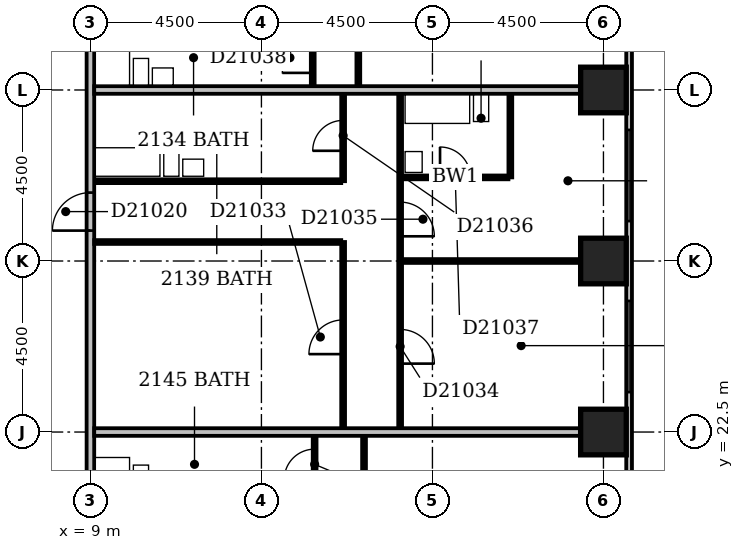
"""IFC4 building model, lengths in metres.
Left out: names, types, materials, properties, quantities, classifications, styles, units other than length and angle.
Written with IfcOpenShell. Run it as: python <this file> out.ifc"""

import sys

from ifc_helpers import new_model, si_unit, direction, frame, frame_2d, origin, origin_2d, place, context, subcontext, project, spatial, rectangle, extrude, element, fill, save


model = new_model("IFC4")
c1 = context("Model", 3, precision=1e-05, world=origin(), true_north=direction((0.0, 1.0)))
c2 = subcontext(c1, "Body", "Model", "MODEL_VIEW")
j1 = project(units=[si_unit("LENGTHUNIT", "METRE"), si_unit("PLANEANGLEUNIT", "RADIAN")], contexts=[c1])
p1 = place(None, origin())
s1 = spatial("IfcSite", under=j1, at=p1, CompositionType="ELEMENT")
p2 = place(p1, origin())
s2 = spatial("IfcBuilding", under=s1, at=p2, CompositionType="ELEMENT")
p3 = place(p2, frame((0.0, 0.0, 86.6)))
s3 = spatial("IfcBuildingStorey", under=s2, at=p3, CompositionType="ELEMENT", Elevation=86.6)
for number, where, z_axis, x_axis in (
    (1, (22.5, 22.5, -0.3), (0.0, 0.0, 1.0), (1.0, 0.0, 0.0)),
    (2, (22.5, 27.0, -0.3), (0.0, 0.0, 1.0), (1.0, 0.0, 0.0)),
    (3, (22.5, 31.5, -0.3), (0.0, 0.0, 1.0), (1.0, 0.0, 0.0)),
):
    element("IfcColumn", number, at=place(p3, frame(where, z_axis=z_axis, x_axis=x_axis)), inside=s3, PredefinedType="COLUMN", context=c2, shape_type="SweptSolid", body=[
        extrude(rectangle(XDim=1.2, YDim=1.2, at=origin_2d()), origin(), (0.0, 0.0, 1.0), 3.6),
    ])
p4 = place(p3, frame((23.175, 17.4, 0.0), z_axis=(0.0, 0.0, 1.0), x_axis=(0.0, 1.0, 0.0)))
e4 = element("IfcWall", 4, at=p4, inside=s3, PredefinedType="STANDARD", context=c2, shape_type="SweptSolid", body=[
    extrude(rectangle(XDim=17.85, YDim=0.15, at=frame_2d((8.925, 0.0))), origin(), (0.0, 0.0, 1.0), 2.7),
])
p5 = place(p4, frame((1.435, 0.0, 0.6)))
e5 = element("IfcOpeningElement", 5, at=p5, cuts=e4, PredefinedType="OPENING", context=c2, shape_type="SweptSolid", body=[
    extrude(rectangle(XDim=2.1, YDim=1.8, at=frame_2d((1.05, 0.9))), frame((0.0, 0.087, 0.0), z_axis=(0.0, -1.0, 0.0), x_axis=(1.0, 0.0, 0.0)), (0.0, 0.0, 1.0), 0.174),
])
p6 = place(p4, frame((6.15, 0.0, 0.6)))
e6 = element("IfcOpeningElement", 6, at=p6, cuts=e4, PredefinedType="OPENING", context=c2, shape_type="SweptSolid", body=[
    extrude(rectangle(XDim=2.4, YDim=1.8, at=frame_2d((1.2, 0.9))), frame((0.0, 0.087, 0.0), z_axis=(0.0, -1.0, 0.0), x_axis=(1.0, 0.0, 0.0)), (0.0, 0.0, 1.0), 0.174),
])
p7 = place(p4, frame((10.65, 0.0, 0.6)))
e7 = element("IfcOpeningElement", 7, at=p7, cuts=e4, PredefinedType="OPENING", context=c2, shape_type="SweptSolid", body=[
    extrude(rectangle(XDim=2.4, YDim=1.8, at=frame_2d((1.2, 0.9))), frame((0.0, 0.087, 0.0), z_axis=(0.0, -1.0, 0.0), x_axis=(1.0, 0.0, 0.0)), (0.0, 0.0, 1.0), 0.174),
])
p8 = place(p4, frame((15.15, 0.0, 0.6)))
e8 = element("IfcOpeningElement", 8, at=p8, cuts=e4, PredefinedType="OPENING", context=c2, shape_type="SweptSolid", body=[
    extrude(rectangle(XDim=2.4, YDim=1.8, at=frame_2d((1.2, 0.9))), frame((0.0, 0.087, 0.0), z_axis=(0.0, -1.0, 0.0), x_axis=(1.0, 0.0, 0.0)), (0.0, 0.0, 1.0), 0.174),
])
p9 = place(p3, frame((9.0, 5.0, 0.0), z_axis=(0.0, 0.0, 1.0), x_axis=(0.0, 1.0, 0.0)))
e9 = element("IfcWall", 9, at=p9, inside=s3, PredefinedType="PARTITIONING", context=c2, shape_type="SweptSolid", body=[
    extrude(rectangle(XDim=44.5, YDim=0.2, at=frame_2d((22.25, 0.0))), origin(), (0.0, 0.0, 1.0), 3.3),
])
p10 = place(p9, frame((28.45, 0.0, 0.0)))
e10 = element("IfcOpeningElement", 10, at=p10, cuts=e9, PredefinedType="OPENING", context=c2, shape_type="SweptSolid", body=[
    extrude(rectangle(XDim=1.0, YDim=2.1, at=frame_2d((0.5, 1.05))), frame((0.0, 0.112, 0.0), z_axis=(0.0, -1.0, 0.0), x_axis=(1.0, 0.0, 0.0)), (0.0, 0.0, 1.0), 0.224),
])
p11 = place(p9, frame((22.8, 0.0, 0.0)))
e11 = element("IfcOpeningElement", 11, at=p11, cuts=e9, PredefinedType="OPENING", context=c2, shape_type="SweptSolid", body=[
    extrude(rectangle(XDim=1.0, YDim=2.1, at=frame_2d((0.5, 1.05))), frame((0.0, 0.112, 0.0), z_axis=(0.0, -1.0, 0.0), x_axis=(1.0, 0.0, 0.0)), (0.0, 0.0, 1.0), 0.224),
])
p12 = place(p9, frame((14.55, 0.0, 0.0)))
e12 = element("IfcOpeningElement", 12, at=p12, cuts=e9, PredefinedType="OPENING", context=c2, shape_type="SweptSolid", body=[
    extrude(rectangle(XDim=1.0, YDim=2.1, at=frame_2d((0.5, 1.05))), frame((0.0, 0.112, 0.0), z_axis=(0.0, -1.0, 0.0), x_axis=(1.0, 0.0, 0.0)), (0.0, 0.0, 1.0), 0.224),
])
p13 = place(p9, frame((9.3, 0.0, 0.0)))
e13 = element("IfcOpeningElement", 13, at=p13, cuts=e9, PredefinedType="OPENING", context=c2, shape_type="SweptSolid", body=[
    extrude(rectangle(XDim=1.0, YDim=2.1, at=frame_2d((0.5, 1.05))), frame((0.0, 0.112, 0.0), z_axis=(0.0, -1.0, 0.0), x_axis=(1.0, 0.0, 0.0)), (0.0, 0.0, 1.0), 0.224),
])
p14 = place(p9, frame((35.0, 0.0, 0.0)))
e14 = element("IfcOpeningElement", 14, at=p14, cuts=e9, PredefinedType="OPENING", context=c2, shape_type="SweptSolid", body=[
    extrude(rectangle(XDim=0.9, YDim=2.1, at=frame_2d((0.45, 1.05))), frame((0.0, 0.112, 0.0), z_axis=(0.0, -1.0, 0.0), x_axis=(1.0, 0.0, 0.0)), (0.0, 0.0, 1.0), 0.224),
])
p15 = place(p9, frame((1.5, 0.0, 0.0)))
e15 = element("IfcOpeningElement", 15, at=p15, cuts=e9, PredefinedType="OPENING", context=c2, shape_type="SweptSolid", body=[
    extrude(rectangle(XDim=0.9, YDim=2.1, at=frame_2d((0.45, 1.05))), frame((0.0, 0.112, 0.0), z_axis=(0.0, -1.0, 0.0), x_axis=(1.0, 0.0, 0.0)), (0.0, 0.0, 1.0), 0.224),
])
p16 = place(p3, frame((16.2, 18.1, 0.0), z_axis=(0.0, 0.0, 1.0), x_axis=(0.0, 1.0, 0.0)))
e16 = element("IfcWall", 16, at=p16, inside=s3, PredefinedType="PARTITIONING", context=c2, shape_type="SweptSolid", body=[
    extrude(rectangle(XDim=4.3, YDim=0.1, at=frame_2d((2.15, 0.0))), origin(), (0.0, 0.0, 1.0), 3.3),
])
p17 = place(p16, frame((1.7, 0.0, 0.0)))
e17 = element("IfcOpeningElement", 17, at=p17, cuts=e16, PredefinedType="OPENING", context=c2, shape_type="SweptSolid", body=[
    extrude(rectangle(XDim=0.9, YDim=2.1, at=frame_2d((0.45, 1.05))), frame((0.0, 0.062, 0.0), z_axis=(0.0, -1.0, 0.0), x_axis=(1.0, 0.0, 0.0)), (0.0, 0.0, 1.0), 0.124),
])
p18 = place(p3, frame((14.9, 20.8, 0.0), z_axis=(0.0, 0.0, 1.0), x_axis=(0.0, 1.0, 0.0)))
e18 = element("IfcWall", 18, at=p18, inside=s3, PredefinedType="PARTITIONING", context=c2, shape_type="SweptSolid", body=[
    extrude(rectangle(XDim=1.6, YDim=0.1, at=frame_2d((0.8, 0.0))), origin(), (0.0, 0.0, 1.0), 3.3),
])
p19 = place(p18, frame((0.45, 0.0, 0.0)))
e19 = element("IfcOpeningElement", 19, at=p19, cuts=e18, PredefinedType="OPENING", context=c2, shape_type="SweptSolid", body=[
    extrude(rectangle(XDim=0.8, YDim=2.1, at=frame_2d((0.4, 1.05))), frame((0.0, 0.062, 0.0), z_axis=(0.0, -1.0, 0.0), x_axis=(1.0, 0.0, 0.0)), (0.0, 0.0, 1.0), 0.124),
])
p20 = place(p3, frame((9.1, 22.5, 0.0), z_axis=(0.0, 0.0, 1.0), x_axis=(1.0, 0.0, 0.0)))
e20 = element("IfcWall", 20, at=p20, inside=s3, PredefinedType="PARTITIONING", context=c2, shape_type="SweptSolid", body=[
    extrude(rectangle(XDim=12.8, YDim=0.2, at=frame_2d((6.4, 0.0))), origin(), (0.0, 0.0, 1.0), 3.3),
])
p21 = place(p3, frame((15.65, 22.6, 0.0), z_axis=(0.0, 0.0, 1.0), x_axis=(0.0, 1.0, 0.0)))
e21 = element("IfcWall", 21, at=p21, inside=s3, PredefinedType="PARTITIONING", context=c2, shape_type="SweptSolid", body=[
    extrude(rectangle(XDim=4.9, YDim=0.1, at=frame_2d((2.45, 0.0))), origin(), (0.0, 0.0, 1.0), 3.3),
])
p22 = place(p21, frame((1.95, 0.0, 0.0)))
e22 = element("IfcOpeningElement", 22, at=p22, cuts=e21, PredefinedType="OPENING", context=c2, shape_type="SweptSolid", body=[
    extrude(rectangle(XDim=0.9, YDim=2.1, at=frame_2d((0.45, 1.05))), frame((0.0, 0.062, 0.0), z_axis=(0.0, -1.0, 0.0), x_axis=(1.0, 0.0, 0.0)), (0.0, 0.0, 1.0), 0.124),
])
p23 = place(p3, frame((17.15, 22.6, 0.0), z_axis=(0.0, 0.0, 1.0), x_axis=(0.0, 1.0, 0.0)))
e23 = element("IfcWall", 23, at=p23, inside=s3, PredefinedType="PARTITIONING", context=c2, shape_type="SweptSolid", body=[
    extrude(rectangle(XDim=8.8, YDim=0.1, at=frame_2d((4.4, 0.0))), origin(), (0.0, 0.0, 1.0), 3.3),
])
p24 = place(p23, frame((1.7, 0.0, 0.0)))
e24 = element("IfcOpeningElement", 24, at=p24, cuts=e23, PredefinedType="OPENING", context=c2, shape_type="SweptSolid", body=[
    extrude(rectangle(XDim=0.9, YDim=2.1, at=frame_2d((0.45, 1.05))), frame((0.0, 0.062, 0.0), z_axis=(0.0, -1.0, 0.0), x_axis=(1.0, 0.0, 0.0)), (0.0, 0.0, 1.0), 0.124),
])
p25 = place(p23, frame((5.05, 0.0, 0.0)))
e25 = element("IfcOpeningElement", 25, at=p25, cuts=e23, PredefinedType="OPENING", context=c2, shape_type="SweptSolid", body=[
    extrude(rectangle(XDim=0.9, YDim=2.1, at=frame_2d((0.45, 1.05))), frame((0.0, 0.062, 0.0), z_axis=(0.0, -1.0, 0.0), x_axis=(1.0, 0.0, 0.0)), (0.0, 0.0, 1.0), 0.124),
])
p26 = place(p3, frame((17.2, 27.0, 0.0), z_axis=(0.0, 0.0, 1.0), x_axis=(1.0, 0.0, 0.0)))
e26 = element("IfcWall", 26, at=p26, inside=s3, PredefinedType="PARTITIONING", context=c2, shape_type="SweptSolid", body=[
    extrude(rectangle(XDim=4.7, YDim=0.1, at=frame_2d((2.35, 0.0))), origin(), (0.0, 0.0, 1.0), 2.7),
])
p27 = place(p3, frame((9.1, 27.5, 0.0), z_axis=(0.0, 0.0, 1.0), x_axis=(1.0, 0.0, 0.0)))
e27 = element("IfcWall", 27, at=p27, inside=s3, PredefinedType="PARTITIONING", context=c2, shape_type="SweptSolid", body=[
    extrude(rectangle(XDim=6.5, YDim=0.1, at=frame_2d((3.25, 0.0))), origin(), (0.0, 0.0, 1.0), 2.7),
])
p28 = place(p3, frame((9.1, 29.1, 0.0), z_axis=(0.0, 0.0, 1.0), x_axis=(1.0, 0.0, 0.0)))
e28 = element("IfcWall", 28, at=p28, inside=s3, PredefinedType="PLUMBINGWALL", context=c2, shape_type="SweptSolid", body=[
    extrude(rectangle(XDim=6.5, YDim=0.1, at=frame_2d((3.25, 0.0))), origin(), (0.0, 0.0, 1.0), 3.3),
])
p29 = place(p3, frame((15.65, 29.1, 0.0), z_axis=(0.0, 0.0, 1.0), x_axis=(0.0, 1.0, 0.0)))
e29 = element("IfcWall", 29, at=p29, inside=s3, PredefinedType="PARTITIONING", context=c2, shape_type="SweptSolid", body=[
    extrude(rectangle(XDim=2.3, YDim=0.1, at=frame_2d((1.15, 0.0))), origin(), (0.0, 0.0, 1.0), 3.3),
])
p30 = place(p29, frame((0.8, 0.0, 0.0)))
e30 = element("IfcOpeningElement", 30, at=p30, cuts=e29, PredefinedType="OPENING", context=c2, shape_type="SweptSolid", body=[
    extrude(rectangle(XDim=0.8, YDim=2.1, at=frame_2d((0.4, 1.05))), frame((0.0, 0.062, 0.0), z_axis=(0.0, -1.0, 0.0), x_axis=(1.0, 0.0, 0.0)), (0.0, 0.0, 1.0), 0.124),
])
p31 = place(p3, frame((17.2, 29.2, 0.0), z_axis=(0.0, 0.0, 1.0), x_axis=(1.0, 0.0, 0.0)))
e31 = element("IfcWall", 31, at=p31, inside=s3, PredefinedType="PLUMBINGWALL", context=c2, shape_type="SweptSolid", body=[
    extrude(rectangle(XDim=2.8, YDim=0.1, at=frame_2d((1.4, 0.0))), origin(), (0.0, 0.0, 1.0), 3.3),
])
p32 = place(p31, frame((1.0, 0.0, 0.0)))
e32 = element("IfcOpeningElement", 32, at=p32, cuts=e31, PredefinedType="OPENING", context=c2, shape_type="SweptSolid", body=[
    extrude(rectangle(XDim=0.8, YDim=2.1, at=frame_2d((0.4, 1.05))), frame((0.0, 0.062, 0.0), z_axis=(0.0, -1.0, 0.0), x_axis=(1.0, 0.0, 0.0)), (0.0, 0.0, 1.0), 0.124),
])
p33 = place(p3, frame((20.05, 29.2, 0.0), z_axis=(0.0, 0.0, 1.0), x_axis=(0.0, 1.0, 0.0)))
e33 = element("IfcWall", 33, at=p33, inside=s3, PredefinedType="PLUMBINGWALL", context=c2, shape_type="SweptSolid", body=[
    extrude(rectangle(XDim=2.2, YDim=0.1, at=frame_2d((1.1, 0.0))), origin(), (0.0, 0.0, 1.0), 3.3),
])
p34 = place(p3, frame((9.1, 31.5, 0.0), z_axis=(0.0, 0.0, 1.0), x_axis=(1.0, 0.0, 0.0)))
e34 = element("IfcWall", 34, at=p34, inside=s3, PredefinedType="PARTITIONING", context=c2, shape_type="SweptSolid", body=[
    extrude(rectangle(XDim=12.8, YDim=0.2, at=frame_2d((6.4, 0.0))), origin(), (0.0, 0.0, 1.0), 3.3),
])
p35 = place(p3, frame((14.85, 31.6, 0.0), z_axis=(0.0, 0.0, 1.0), x_axis=(0.0, 1.0, 0.0)))
e35 = element("IfcWall", 35, at=p35, inside=s3, PredefinedType="PARTITIONING", context=c2, shape_type="SweptSolid", body=[
    extrude(rectangle(XDim=1.6, YDim=0.1, at=frame_2d((0.8, 0.0))), origin(), (0.0, 0.0, 1.0), 3.3),
])
p36 = place(p35, frame((0.35, 0.0, 0.0)))
e36 = element("IfcOpeningElement", 36, at=p36, cuts=e35, PredefinedType="OPENING", context=c2, shape_type="SweptSolid", body=[
    extrude(rectangle(XDim=0.8, YDim=2.1, at=frame_2d((0.4, 1.05))), frame((0.0, 0.062, 0.0), z_axis=(0.0, -1.0, 0.0), x_axis=(1.0, 0.0, 0.0)), (0.0, 0.0, 1.0), 0.124),
])
p37 = place(p3, frame((16.05, 31.6, 0.0), z_axis=(0.0, 0.0, 1.0), x_axis=(0.0, 1.0, 0.0)))
e37 = element("IfcWall", 37, at=p37, inside=s3, PredefinedType="PARTITIONING", context=c2, shape_type="SweptSolid", body=[
    extrude(rectangle(XDim=4.3, YDim=0.1, at=frame_2d((2.15, 0.0))), origin(), (0.0, 0.0, 1.0), 3.3),
])
p38 = place(p37, frame((1.7, 0.0, 0.0)))
e38 = element("IfcOpeningElement", 38, at=p38, cuts=e37, PredefinedType="OPENING", context=c2, shape_type="SweptSolid", body=[
    extrude(rectangle(XDim=0.9, YDim=2.1, at=frame_2d((0.45, 1.05))), frame((0.0, 0.062, 0.0), z_axis=(0.0, -1.0, 0.0), x_axis=(1.0, 0.0, 0.0)), (0.0, 0.0, 1.0), 0.124),
])
p39 = place(p6, origin())
e39 = element("IfcWindow", 39, at=p39, inside=s3, PartitioningType="SINGLE_PANEL", PredefinedType="WINDOW", context=c2, shape_type="SweptSolid", body=[
    extrude(rectangle(XDim=2.4, YDim=1.8, at=frame_2d((1.2, 0.9))), frame((0.0, 0.03, 0.0), z_axis=(0.0, -1.0, 0.0), x_axis=(1.0, 0.0, 0.0)), (0.0, 0.0, 1.0), 0.06),
])
fill(e6, e39)
p40 = place(p7, origin())
e40 = element("IfcWindow", 40, at=p40, inside=s3, PartitioningType="SINGLE_PANEL", PredefinedType="WINDOW", context=c2, shape_type="SweptSolid", body=[
    extrude(rectangle(XDim=2.4, YDim=1.8, at=frame_2d((1.2, 0.9))), frame((0.0, 0.03, 0.0), z_axis=(0.0, -1.0, 0.0), x_axis=(1.0, 0.0, 0.0)), (0.0, 0.0, 1.0), 0.06),
])
fill(e7, e40)
p41 = place(p11, origin())
e41 = element("IfcDoor", 41, at=p41, inside=s3, OperationType="SINGLE_SWING_LEFT", PredefinedType="DOOR", context=c2, shape_type="SweptSolid", body=[
    extrude(rectangle(XDim=1.0, YDim=2.1, at=frame_2d((0.5, 1.05))), frame((0.0, 0.025, 0.0), z_axis=(0.0, -1.0, 0.0), x_axis=(1.0, 0.0, 0.0)), (0.0, 0.0, 1.0), 0.05),
])
fill(e11, e41)
p42 = place(p19, origin())
e42 = element("IfcDoor", 42, at=p42, inside=s3, OperationType="SINGLE_SWING_LEFT", PredefinedType="DOOR", context=c2, shape_type="SweptSolid", body=[
    extrude(rectangle(XDim=0.8, YDim=2.1, at=frame_2d((0.4, 1.05))), frame((0.0, 0.025, 0.0), z_axis=(0.0, -1.0, 0.0), x_axis=(1.0, 0.0, 0.0)), (0.0, 0.0, 1.0), 0.05),
])
fill(e19, e42)
p43 = place(p22, origin())
e43 = element("IfcDoor", 43, at=p43, inside=s3, OperationType="SINGLE_SWING_LEFT", PredefinedType="DOOR", context=c2, shape_type="SweptSolid", body=[
    extrude(rectangle(XDim=0.9, YDim=2.1, at=frame_2d((0.45, 1.05))), frame((0.0, 0.025, 0.0), z_axis=(0.0, -1.0, 0.0), x_axis=(1.0, 0.0, 0.0)), (0.0, 0.0, 1.0), 0.05),
])
fill(e22, e43)
p44 = place(p24, frame((0.9, 0.0, 0.0), z_axis=(0.0, 0.0, 1.0), x_axis=(-1.0, 0.0, 0.0)))
e44 = element("IfcDoor", 44, at=p44, inside=s3, OperationType="SINGLE_SWING_RIGHT", PredefinedType="DOOR", context=c2, shape_type="SweptSolid", body=[
    extrude(rectangle(XDim=0.9, YDim=2.1, at=frame_2d((0.45, 1.05))), frame((0.0, 0.025, 0.0), z_axis=(0.0, -1.0, 0.0), x_axis=(1.0, 0.0, 0.0)), (0.0, 0.0, 1.0), 0.05),
])
fill(e24, e44)
p45 = place(p25, frame((0.9, 0.0, 0.0), z_axis=(0.0, 0.0, 1.0), x_axis=(-1.0, 0.0, 0.0)))
e45 = element("IfcDoor", 45, at=p45, inside=s3, OperationType="SINGLE_SWING_RIGHT", PredefinedType="DOOR", context=c2, shape_type="SweptSolid", body=[
    extrude(rectangle(XDim=0.9, YDim=2.1, at=frame_2d((0.45, 1.05))), frame((0.0, 0.025, 0.0), z_axis=(0.0, -1.0, 0.0), x_axis=(1.0, 0.0, 0.0)), (0.0, 0.0, 1.0), 0.05),
])
fill(e25, e45)
p46 = place(p30, origin())
e46 = element("IfcDoor", 46, at=p46, inside=s3, OperationType="SINGLE_SWING_LEFT", PredefinedType="DOOR", context=c2, shape_type="SweptSolid", body=[
    extrude(rectangle(XDim=0.8, YDim=2.1, at=frame_2d((0.4, 1.05))), frame((0.0, 0.025, 0.0), z_axis=(0.0, -1.0, 0.0), x_axis=(1.0, 0.0, 0.0)), (0.0, 0.0, 1.0), 0.05),
])
fill(e30, e46)
p47 = place(p32, origin())
e47 = element("IfcDoor", 47, at=p47, inside=s3, OperationType="SINGLE_SWING_LEFT", PredefinedType="DOOR", context=c2, shape_type="SweptSolid", body=[
    extrude(rectangle(XDim=0.8, YDim=2.1, at=frame_2d((0.4, 1.05))), frame((0.0, 0.025, 0.0), z_axis=(0.0, -1.0, 0.0), x_axis=(1.0, 0.0, 0.0)), (0.0, 0.0, 1.0), 0.05),
])
fill(e32, e47)
p48 = place(p36, origin())
e48 = element("IfcDoor", 48, at=p48, inside=s3, OperationType="SINGLE_SWING_LEFT", PredefinedType="DOOR", context=c2, shape_type="SweptSolid", body=[
    extrude(rectangle(XDim=0.8, YDim=2.1, at=frame_2d((0.4, 1.05))), frame((0.0, 0.025, 0.0), z_axis=(0.0, -1.0, 0.0), x_axis=(1.0, 0.0, 0.0)), (0.0, 0.0, 1.0), 0.05),
])
fill(e36, e48)
save(model, sys.argv[1])
